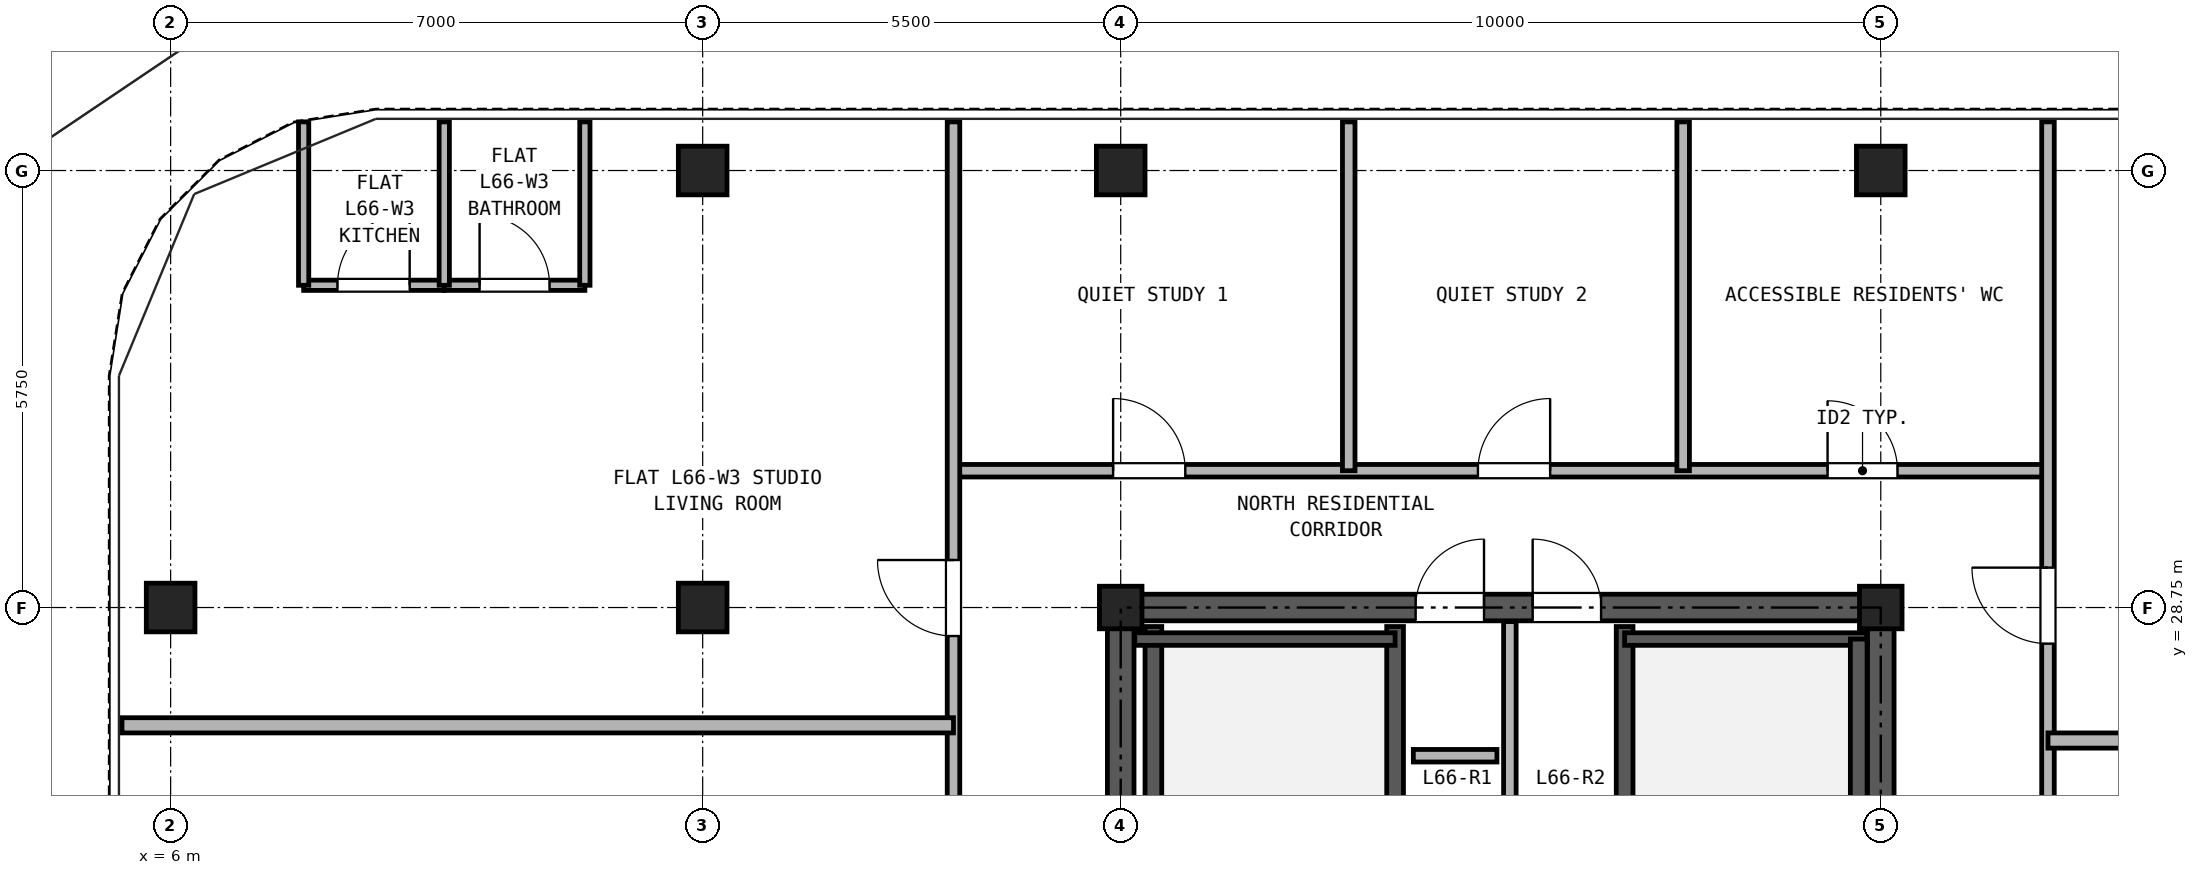
"""IFC4 building model, lengths in metres.
Left out: names, types, materials, properties, quantities, classifications, styles, units other than length and angle.
Written with IfcOpenShell. Run it as: python <this file> out.ifc"""

import sys

from ifc_helpers import new_model, si_unit, direction, frame, frame_2d, origin, origin_2d, place, context, subcontext, project, spatial, rectangle, hollow_rectangle, extrude, source, transform, mapped, element, fill, save


model = new_model("IFC4")
c1 = context("Model", 3, precision=1e-05, world=origin(), true_north=direction((0.0, 1.0)))
c2 = subcontext(c1, "Body", "Model", "MODEL_VIEW")
j1 = project(units=[si_unit("LENGTHUNIT", "METRE"), si_unit("PLANEANGLEUNIT", "RADIAN")], contexts=[c1])
p1 = place(None, origin())
s1 = spatial("IfcSite", under=j1, at=p1, CompositionType="ELEMENT")
p2 = place(p1, origin())
s2 = spatial("IfcBuilding", under=s1, at=p2, CompositionType="ELEMENT")
p3 = place(p2, frame((0.0, 0.0, 232.9)))
s3 = spatial("IfcBuildingStorey", under=s2, at=p3, CompositionType="ELEMENT", Elevation=232.9)
m1 = source(origin(), c2, "Body", "SweptSolid", [
    extrude(hollow_rectangle(XDim=0.64, YDim=0.64, WallThickness=0.035, at=origin_2d()), origin(), (0.0, 0.0, 1.0), 2.98),
])
for number, where, z_axis, x_axis in (
    (1, (13.0, 34.5, 0.0), (0.0, 0.0, 1.0), (1.0, 0.0, 0.0)),
    (2, (18.5, 34.5, 0.0), (0.0, 0.0, 1.0), (1.0, 0.0, 0.0)),
    (3, (28.5, 34.5, 0.0), (0.0, 0.0, 1.0), (1.0, 0.0, 0.0)),
    (4, (6.0, 28.75, 0.0), (0.0, 0.0, 1.0), (1.0, 0.0, 0.0)),
    (5, (13.0, 28.75, 0.0), (0.0, 0.0, 1.0), (1.0, 0.0, 0.0)),
):
    element("IfcColumn", number, at=place(p3, frame(where, z_axis=z_axis, x_axis=x_axis)), inside=s3, PredefinedType="COLUMN", context=c2, shape_type="MappedRepresentation", body=[
        mapped(m1, transform((0.0, 0.0, 0.0), x_axis=(1.0, 0.0, 0.0), y_axis=(0.0, 1.0, 0.0), z_axis=(0.0, 0.0, 1.0), scale=1.0)),
    ])
m2 = source(origin(), c2, "Body", "SweptSolid", [
    extrude(hollow_rectangle(XDim=0.56, YDim=0.56, WallThickness=0.03, at=origin_2d()), origin(), (0.0, 0.0, 1.0), 2.98),
])
for number, where, z_axis, x_axis in (
    (6, (18.5, 28.75, 0.0), (0.0, 0.0, 1.0), (1.0, 0.0, 0.0)),
    (7, (28.5, 28.75, 0.0), (0.0, 0.0, 1.0), (1.0, 0.0, 0.0)),
):
    element("IfcColumn", number, at=place(p3, frame(where, z_axis=z_axis, x_axis=x_axis)), inside=s3, PredefinedType="COLUMN", context=c2, shape_type="MappedRepresentation", body=[
        mapped(m2, transform((0.0, 0.0, 0.0), x_axis=(1.0, 0.0, 0.0), y_axis=(0.0, 1.0, 0.0), z_axis=(0.0, 0.0, 1.0), scale=1.0)),
    ])
p4 = place(p3, frame((18.325, 28.75, 0.0), z_axis=(0.0, 0.0, 1.0), x_axis=(1.0, 0.0, 0.0)))
e8 = element("IfcWall", 8, at=p4, inside=s3, PredefinedType="SHEAR", context=c2, shape_type="SweptSolid", body=[
    extrude(rectangle(XDim=10.35, YDim=0.35, at=frame_2d((5.175, 0.0))), origin(), (0.0, 0.0, 1.0), 2.98),
])
p5 = place(p4, frame((4.055, 0.0, 0.0)))
e9 = element("IfcOpeningElement", 9, at=p5, cuts=e8, PredefinedType="OPENING", context=c2, shape_type="SweptSolid", body=[
    extrude(rectangle(XDim=0.9, YDim=2.05, at=frame_2d((0.45, 1.025))), frame((0.0, 0.185, 0.0), z_axis=(0.0, -1.0, 0.0), x_axis=(1.0, 0.0, 0.0)), (0.0, 0.0, 1.0), 0.37),
])
p6 = place(p4, frame((5.595, 0.0, 0.0)))
e10 = element("IfcOpeningElement", 10, at=p6, cuts=e8, PredefinedType="OPENING", context=c2, shape_type="SweptSolid", body=[
    extrude(rectangle(XDim=0.9, YDim=2.05, at=frame_2d((0.45, 1.025))), frame((0.0, 0.185, 0.0), z_axis=(0.0, -1.0, 0.0), x_axis=(1.0, 0.0, 0.0)), (0.0, 0.0, 1.0), 0.37),
])
p7 = place(p3, frame((18.5, 11.675, 0.0), z_axis=(0.0, 0.0, 1.0), x_axis=(0.0, 1.0, 0.0)))
e11 = element("IfcWall", 11, at=p7, inside=s3, PredefinedType="SHEAR", context=c2, shape_type="SweptSolid", body=[
    extrude(rectangle(XDim=16.9, YDim=0.35, at=frame_2d((8.45, 0.0))), origin(), (0.0, 0.0, 1.0), 2.98),
])
p8 = place(p7, frame((7.475, 0.0, 0.0)))
e12 = element("IfcOpeningElement", 12, at=p8, cuts=e11, PredefinedType="OPENING", context=c2, shape_type="SweptSolid", body=[
    extrude(rectangle(XDim=1.15, YDim=2.2, at=frame_2d((0.575, 1.1))), frame((0.0, 0.185, 0.0), z_axis=(0.0, -1.0, 0.0), x_axis=(1.0, 0.0, 0.0)), (0.0, 0.0, 1.0), 0.37),
])
p9 = place(p3, frame((28.5, 11.675, 0.0), z_axis=(0.0, 0.0, 1.0), x_axis=(0.0, 1.0, 0.0)))
e13 = element("IfcWall", 13, at=p9, inside=s3, PredefinedType="SHEAR", context=c2, shape_type="SweptSolid", body=[
    extrude(rectangle(XDim=16.9, YDim=0.35, at=frame_2d((8.45, 0.0))), origin(), (0.0, 0.0, 1.0), 2.98),
])
p10 = place(p9, frame((7.475, 0.0, 0.0)))
e14 = element("IfcOpeningElement", 14, at=p10, cuts=e13, PredefinedType="OPENING", context=c2, shape_type="SweptSolid", body=[
    extrude(rectangle(XDim=1.15, YDim=2.2, at=frame_2d((0.575, 1.1))), frame((0.0, 0.185, 0.0), z_axis=(0.0, -1.0, 0.0), x_axis=(1.0, 0.0, 0.0)), (0.0, 0.0, 1.0), 0.37),
])
for number, where, z_axis, x_axis in (
    (15, (18.93, 21.39, 0.0), (0.0, 0.0, 1.0), (0.0, 1.0, 0.0)),
    (16, (22.11, 21.39, 0.0), (0.0, 0.0, 1.0), (0.0, 1.0, 0.0)),
    (17, (25.13, 21.39, 0.0), (0.0, 0.0, 1.0), (0.0, 1.0, 0.0)),
):
    element("IfcWall", number, at=place(p3, frame(where, z_axis=z_axis, x_axis=x_axis)), inside=s3, PredefinedType="SOLIDWALL", context=c2, shape_type="SweptSolid", body=[
        extrude(rectangle(XDim=7.11, YDim=0.22, at=frame_2d((3.555, 0.0))), origin(), (0.0, 0.0, 1.0), 2.98),
    ])
p11 = place(p3, frame((18.685, 28.335, 0.0), z_axis=(0.0, 0.0, 1.0), x_axis=(1.0, 0.0, 0.0)))
e18 = element("IfcWall", 18, at=p11, inside=s3, PredefinedType="PARTITIONING", context=c2, shape_type="SweptSolid", body=[
    extrude(rectangle(XDim=3.425, YDim=0.165, at=frame_2d((1.712, 0.0))), origin(), (0.0, 0.0, 1.0), 2.98),
])
p12 = place(p3, frame((25.13, 28.335, 0.0), z_axis=(0.0, 0.0, 1.0), x_axis=(1.0, 0.0, 0.0)))
e19 = element("IfcWall", 19, at=p12, inside=s3, PredefinedType="PARTITIONING", context=c2, shape_type="SweptSolid", body=[
    extrude(rectangle(XDim=3.185, YDim=0.165, at=frame_2d((1.593, 0.0))), origin(), (0.0, 0.0, 1.0), 2.98),
])
p13 = place(p3, frame((28.21, 21.39, 0.0), z_axis=(0.0, 0.0, 1.0), x_axis=(0.0, 1.0, 0.0)))
e20 = element("IfcWall", 20, at=p13, inside=s3, PredefinedType="SOLIDWALL", context=c2, shape_type="SweptSolid", body=[
    extrude(rectangle(XDim=6.945, YDim=0.22, at=frame_2d((3.473, 0.0))), origin(), (0.0, 0.0, 1.0), 2.98),
])
p14 = place(p3, frame((23.62, 24.4, 0.0), z_axis=(0.0, 0.0, 1.0), x_axis=(0.0, 1.0, 0.0)))
e21 = element("IfcWall", 21, at=p14, inside=s3, PredefinedType="PARTITIONING", context=c2, shape_type="SweptSolid", body=[
    extrude(rectangle(XDim=4.165, YDim=0.165, at=frame_2d((2.083, 0.0))), origin(), (0.0, 0.0, 1.0), 2.98),
])
p15 = place(p3, frame((16.3, 30.55, 0.0), z_axis=(0.0, 0.0, 1.0), x_axis=(1.0, 0.0, 0.0)))
e22 = element("IfcWall", 22, at=p15, inside=s3, PredefinedType="PARTITIONING", context=c2, shape_type="SweptSolid", body=[
    extrude(rectangle(XDim=14.4, YDim=0.165, at=frame_2d((7.2, 0.0))), origin(), (0.0, 0.0, 1.0), 2.98),
])
p16 = place(p15, frame((2.1, 0.0, 0.0)))
e23 = element("IfcOpeningElement", 23, at=p16, cuts=e22, PredefinedType="OPENING", context=c2, shape_type="SweptSolid", body=[
    extrude(rectangle(XDim=0.95, YDim=2.15, at=frame_2d((0.475, 1.075))), frame((0.0, 0.093, 0.0), z_axis=(0.0, -1.0, 0.0), x_axis=(1.0, 0.0, 0.0)), (0.0, 0.0, 1.0), 0.185),
])
p17 = place(p15, frame((6.9, 0.0, 0.0)))
e24 = element("IfcOpeningElement", 24, at=p17, cuts=e22, PredefinedType="OPENING", context=c2, shape_type="SweptSolid", body=[
    extrude(rectangle(XDim=0.95, YDim=2.15, at=frame_2d((0.475, 1.075))), frame((0.0, 0.093, 0.0), z_axis=(0.0, -1.0, 0.0), x_axis=(1.0, 0.0, 0.0)), (0.0, 0.0, 1.0), 0.185),
])
p18 = place(p15, frame((11.5, 0.0, 0.0)))
e25 = element("IfcOpeningElement", 25, at=p18, cuts=e22, PredefinedType="OPENING", context=c2, shape_type="SweptSolid", body=[
    extrude(rectangle(XDim=0.92, YDim=2.1, at=frame_2d((0.46, 1.05))), frame((0.0, 0.093, 0.0), z_axis=(0.0, -1.0, 0.0), x_axis=(1.0, 0.0, 0.0)), (0.0, 0.0, 1.0), 0.185),
])
p19 = place(p3, frame((16.3, 11.45, 0.0), z_axis=(0.0, 0.0, 1.0), x_axis=(0.0, 1.0, 0.0)))
e26 = element("IfcWall", 26, at=p19, inside=s3, PredefinedType="PARTITIONING", context=c2, shape_type="SweptSolid", body=[
    extrude(rectangle(XDim=23.69, YDim=0.165, at=frame_2d((11.845, 0.0))), origin(), (0.0, 0.0, 1.0), 2.98),
])
p20 = place(p19, frame((3.275, 0.0, 0.0)))
e27 = element("IfcOpeningElement", 27, at=p20, cuts=e26, PredefinedType="OPENING", context=c2, shape_type="SweptSolid", body=[
    extrude(rectangle(XDim=1.0, YDim=2.15, at=frame_2d((0.5, 1.075))), frame((0.0, 0.093, 0.0), z_axis=(0.0, -1.0, 0.0), x_axis=(1.0, 0.0, 0.0)), (0.0, 0.0, 1.0), 0.185),
])
p21 = place(p19, frame((11.15, 0.0, 0.0)))
e28 = element("IfcOpeningElement", 28, at=p21, cuts=e26, PredefinedType="OPENING", context=c2, shape_type="SweptSolid", body=[
    extrude(rectangle(XDim=1.0, YDim=2.15, at=frame_2d((0.5, 1.075))), frame((0.0, 0.093, 0.0), z_axis=(0.0, -1.0, 0.0), x_axis=(1.0, 0.0, 0.0)), (0.0, 0.0, 1.0), 0.185),
])
p22 = place(p19, frame((16.925, 0.0, 0.0)))
e29 = element("IfcOpeningElement", 29, at=p22, cuts=e26, PredefinedType="OPENING", context=c2, shape_type="SweptSolid", body=[
    extrude(rectangle(XDim=1.0, YDim=2.15, at=frame_2d((0.5, 1.075))), frame((0.0, 0.093, 0.0), z_axis=(0.0, -1.0, 0.0), x_axis=(1.0, 0.0, 0.0)), (0.0, 0.0, 1.0), 0.185),
])
p23 = place(p3, frame((30.7, 11.45, 0.0), z_axis=(0.0, 0.0, 1.0), x_axis=(0.0, 1.0, 0.0)))
e30 = element("IfcWall", 30, at=p23, inside=s3, PredefinedType="PARTITIONING", context=c2, shape_type="SweptSolid", body=[
    extrude(rectangle(XDim=23.69, YDim=0.165, at=frame_2d((11.845, 0.0))), origin(), (0.0, 0.0, 1.0), 2.98),
])
p24 = place(p23, frame((3.025, 0.0, 0.0)))
e31 = element("IfcOpeningElement", 31, at=p24, cuts=e30, PredefinedType="OPENING", context=c2, shape_type="SweptSolid", body=[
    extrude(rectangle(XDim=1.0, YDim=2.15, at=frame_2d((0.5, 1.075))), frame((0.0, 0.093, 0.0), z_axis=(0.0, -1.0, 0.0), x_axis=(1.0, 0.0, 0.0)), (0.0, 0.0, 1.0), 0.185),
])
p25 = place(p23, frame((10.8, 0.0, 0.0)))
e32 = element("IfcOpeningElement", 32, at=p25, cuts=e30, PredefinedType="OPENING", context=c2, shape_type="SweptSolid", body=[
    extrude(rectangle(XDim=1.0, YDim=2.15, at=frame_2d((0.5, 1.075))), frame((0.0, 0.093, 0.0), z_axis=(0.0, -1.0, 0.0), x_axis=(1.0, 0.0, 0.0)), (0.0, 0.0, 1.0), 0.185),
])
p26 = place(p23, frame((16.825, 0.0, 0.0)))
e33 = element("IfcOpeningElement", 33, at=p26, cuts=e30, PredefinedType="OPENING", context=c2, shape_type="SweptSolid", body=[
    extrude(rectangle(XDim=1.0, YDim=2.15, at=frame_2d((0.5, 1.075))), frame((0.0, 0.093, 0.0), z_axis=(0.0, -1.0, 0.0), x_axis=(1.0, 0.0, 0.0)), (0.0, 0.0, 1.0), 0.185),
])
p27 = place(p3, frame((5.36, 27.2, 0.0), z_axis=(0.0, 0.0, 1.0), x_axis=(1.0, 0.0, 0.0)))
e34 = element("IfcWall", 34, at=p27, inside=s3, PredefinedType="PARTITIONING", context=c2, shape_type="SweptSolid", body=[
    extrude(rectangle(XDim=10.94, YDim=0.2, at=frame_2d((5.47, 0.0))), origin(), (0.0, 0.0, 1.0), 2.98),
])
p28 = place(p3, frame((7.75, 32.99, 0.0), z_axis=(0.0, 0.0, 1.0), x_axis=(1.0, 0.0, 0.0)))
e35 = element("IfcWall", 35, at=p28, inside=s3, PredefinedType="PARTITIONING", context=c2, shape_type="SweptSolid", body=[
    extrude(rectangle(XDim=1.85, YDim=0.135, at=frame_2d((0.925, 0.0))), origin(), (0.0, 0.0, 1.0), 2.98),
])
p29 = place(p28, frame((0.445, 0.0, 0.0)))
e36 = element("IfcOpeningElement", 36, at=p29, cuts=e35, PredefinedType="OPENING", context=c2, shape_type="SweptSolid", body=[
    extrude(rectangle(XDim=0.95, YDim=2.15, at=frame_2d((0.475, 1.075))), frame((0.0, 0.077, 0.0), z_axis=(0.0, -1.0, 0.0), x_axis=(1.0, 0.0, 0.0)), (0.0, 0.0, 1.0), 0.155),
])
p30 = place(p3, frame((9.6, 32.99, 0.0), z_axis=(0.0, 0.0, 1.0), x_axis=(1.0, 0.0, 0.0)))
e37 = element("IfcWall", 37, at=p30, inside=s3, PredefinedType="PARTITIONING", context=c2, shape_type="SweptSolid", body=[
    extrude(rectangle(XDim=1.85, YDim=0.135, at=frame_2d((0.925, 0.0))), origin(), (0.0, 0.0, 1.0), 2.98),
])
p31 = place(p30, frame((0.465, 0.0, 0.0)))
e38 = element("IfcOpeningElement", 38, at=p31, cuts=e37, PredefinedType="OPENING", context=c2, shape_type="SweptSolid", body=[
    extrude(rectangle(XDim=0.92, YDim=2.1, at=frame_2d((0.46, 1.05))), frame((0.0, 0.077, 0.0), z_axis=(0.0, -1.0, 0.0), x_axis=(1.0, 0.0, 0.0)), (0.0, 0.0, 1.0), 0.155),
])
for number, where, z_axis, x_axis in (
    (39, (7.75, 32.99, 0.0), (0.0, 0.0, 1.0), (0.0, 1.0, 0.0)),
    (40, (9.6, 32.99, 0.0), (0.0, 0.0, 1.0), (0.0, 1.0, 0.0)),
    (41, (11.45, 32.99, 0.0), (0.0, 0.0, 1.0), (0.0, 1.0, 0.0)),
):
    element("IfcWall", number, at=place(p3, frame(where, z_axis=z_axis, x_axis=x_axis)), inside=s3, PredefinedType="PARTITIONING", context=c2, shape_type="SweptSolid", body=[
        extrude(rectangle(XDim=2.15, YDim=0.135, at=frame_2d((1.075, 0.0))), origin(), (0.0, 0.0, 1.0), 2.98),
    ])
p32 = place(p3, frame((30.7, 27.0, 0.0), z_axis=(0.0, 0.0, 1.0), x_axis=(1.0, 0.0, 0.0)))
e42 = element("IfcWall", 42, at=p32, inside=s3, PredefinedType="PARTITIONING", context=c2, shape_type="SweptSolid", body=[
    extrude(rectangle(XDim=10.94, YDim=0.2, at=frame_2d((5.47, 0.0))), origin(), (0.0, 0.0, 1.0), 2.98),
])
for number, where, z_axis, x_axis in (
    (43, (21.5, 30.55, 0.0), (0.0, 0.0, 1.0), (0.0, 1.0, 0.0)),
    (44, (25.9, 30.55, 0.0), (0.0, 0.0, 1.0), (0.0, 1.0, 0.0)),
):
    element("IfcWall", number, at=place(p3, frame(where, z_axis=z_axis, x_axis=x_axis)), inside=s3, PredefinedType="PARTITIONING", context=c2, shape_type="SweptSolid", body=[
        extrude(rectangle(XDim=4.59, YDim=0.165, at=frame_2d((2.295, 0.0))), origin(), (0.0, 0.0, 1.0), 2.98),
    ])
p33 = place(p3, frame((22.35, 26.8, 0.0), z_axis=(0.0, 0.0, 1.0), x_axis=(1.0, 0.0, 0.0)))
e45 = element("IfcWall", 45, at=p33, inside=s3, PredefinedType="PARTITIONING", context=c2, shape_type="SweptSolid", body=[
    extrude(rectangle(XDim=1.1, YDim=0.165, at=frame_2d((0.55, 0.0))), origin(), (0.0, 0.0, 1.0), 2.98),
])
p34 = place(p5, origin())
e46 = element("IfcDoor", 46, at=p34, inside=s3, OperationType="SINGLE_SWING_RIGHT", PredefinedType="DOOR", context=c2, shape_type="SweptSolid", body=[
    extrude(rectangle(XDim=0.9, YDim=2.05, at=frame_2d((0.45, 1.025))), frame((0.0, 0.025, 0.0), z_axis=(0.0, -1.0, 0.0), x_axis=(1.0, 0.0, 0.0)), (0.0, 0.0, 1.0), 0.05),
])
fill(e9, e46)
p35 = place(p6, origin())
e47 = element("IfcDoor", 47, at=p35, inside=s3, OperationType="SINGLE_SWING_LEFT", PredefinedType="DOOR", context=c2, shape_type="SweptSolid", body=[
    extrude(rectangle(XDim=0.9, YDim=2.05, at=frame_2d((0.45, 1.025))), frame((0.0, 0.025, 0.0), z_axis=(0.0, -1.0, 0.0), x_axis=(1.0, 0.0, 0.0)), (0.0, 0.0, 1.0), 0.05),
])
fill(e10, e47)
p36 = place(p29, frame((0.95, 0.0, 0.0), z_axis=(0.0, 0.0, 1.0), x_axis=(-1.0, 0.0, 0.0)))
e48 = element("IfcDoor", 48, at=p36, inside=s3, OperationType="SINGLE_SWING_RIGHT", PredefinedType="DOOR", context=c2, shape_type="SweptSolid", body=[
    extrude(rectangle(XDim=0.95, YDim=2.15, at=frame_2d((0.475, 1.075))), frame((0.0, 0.025, 0.0), z_axis=(0.0, -1.0, 0.0), x_axis=(1.0, 0.0, 0.0)), (0.0, 0.0, 1.0), 0.05),
])
fill(e36, e48)
p37 = place(p31, frame((0.92, 0.0, 0.0), z_axis=(0.0, 0.0, 1.0), x_axis=(-1.0, 0.0, 0.0)))
e49 = element("IfcDoor", 49, at=p37, inside=s3, OperationType="SINGLE_SWING_LEFT", PredefinedType="DOOR", context=c2, shape_type="SweptSolid", body=[
    extrude(rectangle(XDim=0.92, YDim=2.1, at=frame_2d((0.46, 1.05))), frame((0.0, 0.025, 0.0), z_axis=(0.0, -1.0, 0.0), x_axis=(1.0, 0.0, 0.0)), (0.0, 0.0, 1.0), 0.05),
])
fill(e38, e49)
p38 = place(p22, origin())
e50 = element("IfcDoor", 50, at=p38, inside=s3, OperationType="SINGLE_SWING_RIGHT", PredefinedType="DOOR", context=c2, shape_type="SweptSolid", body=[
    extrude(rectangle(XDim=1.0, YDim=2.15, at=frame_2d((0.5, 1.075))), frame((0.0, 0.025, 0.0), z_axis=(0.0, -1.0, 0.0), x_axis=(1.0, 0.0, 0.0)), (0.0, 0.0, 1.0), 0.05),
])
fill(e29, e50)
p39 = place(p26, frame((1.0, 0.0, 0.0), z_axis=(0.0, 0.0, 1.0), x_axis=(-1.0, 0.0, 0.0)))
e51 = element("IfcDoor", 51, at=p39, inside=s3, OperationType="SINGLE_SWING_RIGHT", PredefinedType="DOOR", context=c2, shape_type="SweptSolid", body=[
    extrude(rectangle(XDim=1.0, YDim=2.15, at=frame_2d((0.5, 1.075))), frame((0.0, 0.025, 0.0), z_axis=(0.0, -1.0, 0.0), x_axis=(1.0, 0.0, 0.0)), (0.0, 0.0, 1.0), 0.05),
])
fill(e33, e51)
p40 = place(p16, origin())
e52 = element("IfcDoor", 52, at=p40, inside=s3, OperationType="SINGLE_SWING_LEFT", PredefinedType="DOOR", context=c2, shape_type="SweptSolid", body=[
    extrude(rectangle(XDim=0.95, YDim=2.15, at=frame_2d((0.475, 1.075))), frame((0.0, 0.025, 0.0), z_axis=(0.0, -1.0, 0.0), x_axis=(1.0, 0.0, 0.0)), (0.0, 0.0, 1.0), 0.05),
])
fill(e23, e52)
p41 = place(p17, origin())
e53 = element("IfcDoor", 53, at=p41, inside=s3, OperationType="SINGLE_SWING_RIGHT", PredefinedType="DOOR", context=c2, shape_type="SweptSolid", body=[
    extrude(rectangle(XDim=0.95, YDim=2.15, at=frame_2d((0.475, 1.075))), frame((0.0, 0.025, 0.0), z_axis=(0.0, -1.0, 0.0), x_axis=(1.0, 0.0, 0.0)), (0.0, 0.0, 1.0), 0.05),
])
fill(e24, e53)
p42 = place(p18, origin())
e54 = element("IfcDoor", 54, at=p42, inside=s3, OperationType="SINGLE_SWING_LEFT", PredefinedType="DOOR", context=c2, shape_type="SweptSolid", body=[
    extrude(rectangle(XDim=0.92, YDim=2.1, at=frame_2d((0.46, 1.05))), frame((0.0, 0.025, 0.0), z_axis=(0.0, -1.0, 0.0), x_axis=(1.0, 0.0, 0.0)), (0.0, 0.0, 1.0), 0.05),
])
fill(e25, e54)
save(model, sys.argv[1])
